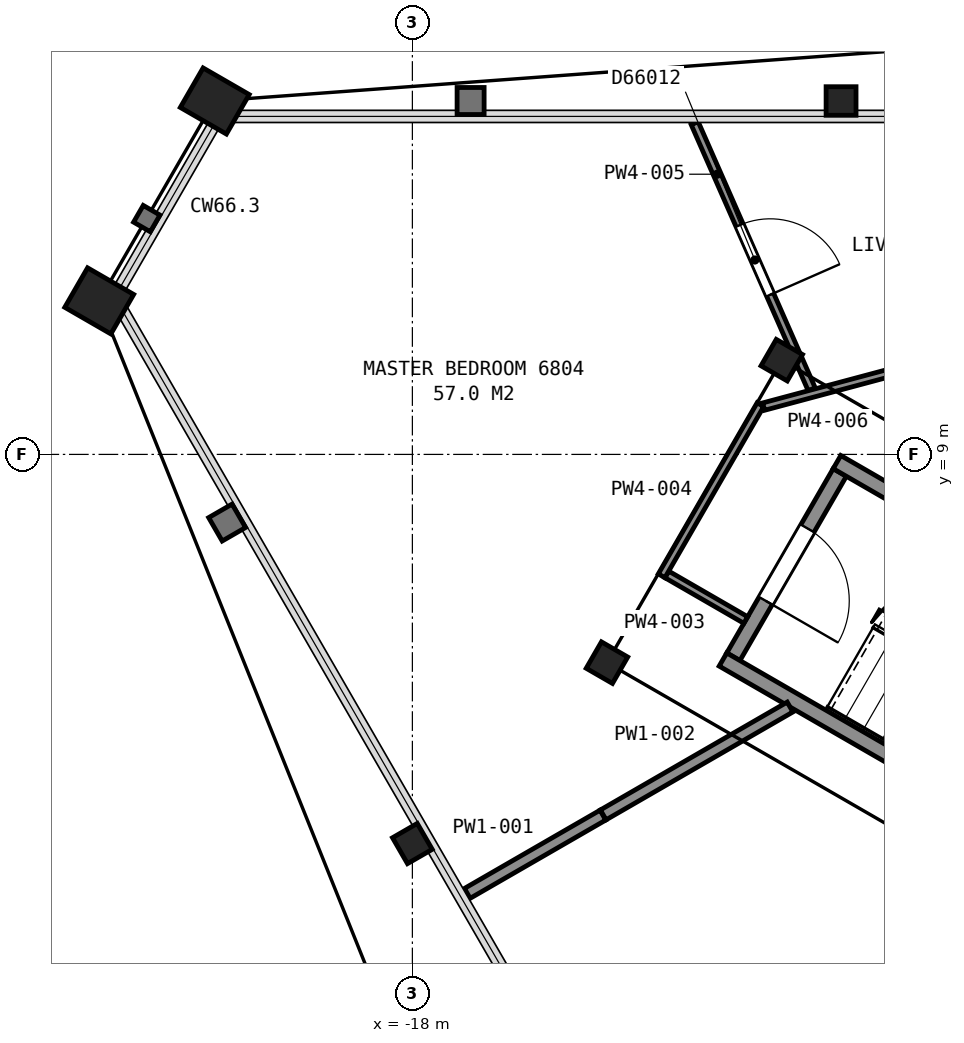
"""IFC4 building model, lengths in metres.
Left out: names, types, materials, properties, quantities, classifications, styles, units other than length and angle.
Written with IfcOpenShell. Run it as: python <this file> out.ifc"""

import sys

from ifc_helpers import new_model, si_unit, direction, frame, frame_2d, origin, origin_2d, place, context, subcontext, project, spatial, rectangle, hollow_rectangle, i_section, extrude, element, fill, save


model = new_model("IFC4")
c1 = context("Model", 3, precision=1e-05, world=origin(), true_north=direction((0.0, 1.0)))
c2 = subcontext(c1, "Body", "Model", "MODEL_VIEW")
j1 = project(units=[si_unit("LENGTHUNIT", "METRE"), si_unit("PLANEANGLEUNIT", "RADIAN")], contexts=[c1])
p1 = place(None, origin())
s1 = spatial("IfcSite", under=j1, at=p1, CompositionType="ELEMENT")
p2 = place(p1, origin())
s2 = spatial("IfcBuilding", under=s1, at=p2, CompositionType="ELEMENT")
p3 = place(p2, frame((0.0, 0.0, 271.4)))
s3 = spatial("IfcBuildingStorey", under=s2, at=p3, CompositionType="ELEMENT", Elevation=271.4)
p4 = place(p3, frame((-12.36, 13.65, 0.0), z_axis=(0.0, 0.0, 1.0), x_axis=(1.0, 0.0, 0.0)))
e1 = element("IfcColumn", 1, at=p4, inside=s3, PredefinedType="COLUMN", context=c2, shape_type="SweptSolid", body=[
    extrude(i_section(OverallWidth=0.394, OverallDepth=0.376, WebThickness=0.017, FlangeThickness=0.028, FilletRadius=0.015, at=origin_2d()), origin(), (0.0, 0.0, 1.0), 3.7),
])
for number, where, z_axis, x_axis in (
    (2, (-20.6, 13.65, 0.0), (0.0, 0.0, 1.0), (0.5, 0.866, 0.0)),
    (3, (-22.12, 11.02, 0.0), (0.0, 0.0, 1.0), (0.5, 0.866, 0.0)),
):
    element("IfcColumn", number, at=place(p3, frame(where, z_axis=z_axis, x_axis=x_axis)), inside=s3, PredefinedType="COLUMN", context=c2, shape_type="SweptSolid", body=[
        extrude(hollow_rectangle(XDim=0.6, YDim=0.7, WallThickness=0.04, at=origin_2d()), origin(), (0.0, 0.0, 1.0), 3.7),
    ])
p5 = place(p3, frame((-18.0, 3.88, 0.0), z_axis=(0.0, 0.0, 1.0), x_axis=(-0.5, 0.866025403784, 0.0)))
e4 = element("IfcColumn", 4, at=p5, inside=s3, PredefinedType="COLUMN", context=c2, shape_type="SweptSolid", body=[
    extrude(i_section(OverallWidth=0.394, OverallDepth=0.376, WebThickness=0.017, FlangeThickness=0.028, FilletRadius=0.015, at=origin_2d()), origin(), (0.0, 0.0, 1.0), 3.7),
])
for number, where, z_axis, x_axis in (
    (5, (-13.14, 10.24, 0.0), (0.0, 0.0, 1.0), (0.5, 0.866, 0.0)),
    (6, (-15.44, 6.26, 0.0), (0.0, 0.0, 1.0), (0.5, 0.866, 0.0)),
):
    element("IfcColumn", number, at=place(p3, frame(where, z_axis=z_axis, x_axis=x_axis)), inside=s3, PredefinedType="COLUMN", context=c2, shape_type="SweptSolid", body=[
        extrude(i_section(OverallWidth=0.401, OverallDepth=0.399, WebThickness=0.025, FlangeThickness=0.04, FilletRadius=0.015, at=origin_2d()), origin(), (0.0, 0.0, 1.0), 3.7),
    ])
p6 = place(p3, frame((-12.377, 8.762, 0.0), z_axis=(0.0, 0.0, 1.0), x_axis=(-0.500049511043, -0.865996816683, 0.0)))
e7 = element("IfcWall", 7, at=p6, inside=s3, PredefinedType="PARTITIONING", context=c2, shape_type="SweptSolid", body=[
    extrude(rectangle(XDim=2.8, YDim=0.2, at=frame_2d((1.4, 0.0))), origin(), (0.0, 0.0, 1.0), 3.45),
])
p7 = place(p6, frame((0.85, 0.0, 0.0)))
e8 = element("IfcOpeningElement", 8, at=p7, cuts=e7, PredefinedType="OPENING", context=c2, shape_type="SweptSolid", body=[
    extrude(rectangle(XDim=1.1, YDim=2.1, at=frame_2d((0.55, 1.05))), frame((0.0, 0.11, 0.0), z_axis=(0.0, -1.0, 0.0), x_axis=(1.0, 0.0, 0.0)), (0.0, 0.0, 1.0), 0.22),
])
for number, where, z_axis, x_axis in (
    (9, (-7.678, 2.701, 0.0), (0.0, 0.0, 1.0), (-0.866, 0.5, 0.0)),
    (10, (-6.178, 5.299, 0.0), (0.0, 0.0, 1.0), (-0.866, 0.5, 0.0)),
):
    element("IfcWall", number, at=place(p3, frame(where, z_axis=z_axis, x_axis=x_axis)), inside=s3, PredefinedType="PARTITIONING", context=c2, shape_type="SweptSolid", body=[
        extrude(rectangle(XDim=7.2, YDim=0.2, at=frame_2d((3.6, 0.0))), origin(), (0.0, 0.0, 1.0), 3.45),
    ])
p8 = place(p3, frame((-17.278, 3.224, 0.0), z_axis=(0.0, 0.0, 1.0), x_axis=(0.8661500768, 0.499783997803, 0.0)))
e11 = element("IfcWall", 11, at=p8, inside=s3, PredefinedType="PARTITIONING", context=c2, shape_type="SweptSolid", body=[
    extrude(rectangle(XDim=2.061, YDim=0.15, at=frame_2d((1.03, 0.0))), origin(), (0.0, 0.0, 1.0), 2.723),
])
p9 = place(p3, frame((-15.489, 4.257, 0.0), z_axis=(0.0, 0.0, 1.0), x_axis=(0.866053804324, 0.499950805595, 0.0)))
e12 = element("IfcWall", 12, at=p9, inside=s3, PredefinedType="PARTITIONING", context=c2, shape_type="SweptSolid", body=[
    extrude(rectangle(XDim=2.838, YDim=0.15, at=frame_2d((1.419, 0.0))), origin(), (0.0, 0.0, 1.0), 2.723),
])
p10 = place(p3, frame((-14.653, 7.421, 0.0), z_axis=(0.0, 0.0, 1.0), x_axis=(0.865941482684, -0.500145327446, 0.0)))
e13 = element("IfcWall", 13, at=p10, inside=s3, PredefinedType="PARTITIONING", context=c2, shape_type="SweptSolid", body=[
    extrude(rectangle(XDim=1.199, YDim=0.1, at=frame_2d((0.6, 0.0))), origin(), (0.0, 0.0, 1.0), 2.723),
])
p11 = place(p3, frame((-14.721, 7.403, 0.0), z_axis=(0.0, 0.0, 1.0), x_axis=(0.500006934395, 0.866021400173, 0.0)))
e14 = element("IfcWall", 14, at=p11, inside=s3, PredefinedType="PARTITIONING", context=c2, shape_type="SweptSolid", body=[
    extrude(rectangle(XDim=2.6, YDim=0.1, at=frame_2d((1.3, 0.0))), origin(), (0.0, 0.0, 1.0), 2.723),
])
p12 = place(p3, frame((-12.747, 9.857, 0.0), z_axis=(0.0, 0.0, 1.0), x_axis=(-0.402509649346, 0.91541574281, 0.0)))
e15 = element("IfcWall", 15, at=p12, inside=s3, PredefinedType="PARTITIONING", context=c2, shape_type="SweptSolid", body=[
    extrude(rectangle(XDim=3.824, YDim=0.1, at=frame_2d((1.912, 0.0))), origin(), (0.0, 0.0, 1.0), 2.723),
])
p13 = place(p12, frame((1.357, 0.0, 0.0)))
e16 = element("IfcOpeningElement", 16, at=p13, cuts=e15, PredefinedType="OPENING", context=c2, shape_type="SweptSolid", body=[
    extrude(rectangle(XDim=1.0, YDim=2.1, at=frame_2d((0.5, 1.05))), frame((0.0, 0.06, 0.0), z_axis=(0.0, -1.0, 0.0), x_axis=(1.0, 0.0, 0.0)), (0.0, 0.0, 1.0), 0.12),
])
p14 = place(p3, frame((-13.378, 9.629, 0.0), z_axis=(0.0, 0.0, 1.0), x_axis=(0.966007272337, 0.258514892785, 0.0)))
e17 = element("IfcWall", 17, at=p14, inside=s3, PredefinedType="PARTITIONING", context=c2, shape_type="SweptSolid", body=[
    extrude(rectangle(XDim=1.747, YDim=0.1, at=frame_2d((0.874, 0.0))), origin(), (0.0, 0.0, 1.0), 2.723),
])
p15 = place(p7, origin())
e18 = element("IfcDoor", 18, at=p15, inside=s3, OperationType="SINGLE_SWING_RIGHT", PredefinedType="DOOR", context=c2, shape_type="SweptSolid", body=[
    extrude(rectangle(XDim=1.1, YDim=2.1, at=frame_2d((0.55, 1.05))), frame((0.0, 0.025, 0.0), z_axis=(0.0, -1.0, 0.0), x_axis=(1.0, 0.0, 0.0)), (0.0, 0.0, 1.0), 0.05),
])
fill(e8, e18)
p16 = place(p13, origin())
e19 = element("IfcDoor", 19, at=p16, inside=s3, OperationType="SINGLE_SWING_LEFT", PredefinedType="DOOR", context=c2, shape_type="SweptSolid", body=[
    extrude(rectangle(XDim=1.0, YDim=2.1, at=frame_2d((0.5, 1.05))), frame((0.0, 0.025, 0.0), z_axis=(0.0, -1.0, 0.0), x_axis=(1.0, 0.0, 0.0)), (0.0, 0.0, 1.0), 0.05),
])
fill(e16, e19)
save(model, sys.argv[1])
